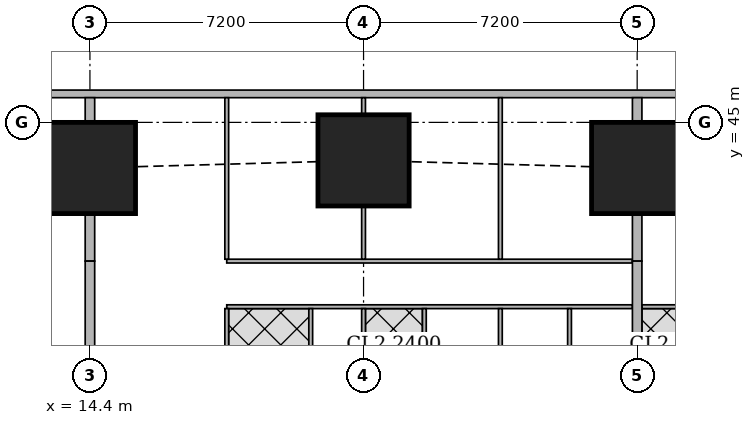
"""IFC4 building model, lengths in metres.
Left out: names, types, materials, properties, quantities, classifications, styles, units other than length and angle.
Written with IfcOpenShell. Run it as: python <this file> out.ifc"""

import sys

from ifc_helpers import new_model, si_unit, direction, frame, frame_2d, origin, origin_2d, place, context, subcontext, project, spatial, rectangle, extrude, element, fill, save


model = new_model("IFC4")
c1 = context("Model", 3, precision=1e-05, world=origin(), true_north=direction((0.0, 1.0)))
c2 = subcontext(c1, "Body", "Model", "MODEL_VIEW")
j1 = project(units=[si_unit("LENGTHUNIT", "METRE"), si_unit("PLANEANGLEUNIT", "RADIAN")], contexts=[c1])
p1 = place(None, origin())
s1 = spatial("IfcSite", under=j1, at=p1, CompositionType="ELEMENT")
p2 = place(p1, origin())
s2 = spatial("IfcBuilding", under=s1, at=p2, CompositionType="ELEMENT")
p3 = place(p2, frame((0.0, 0.0, 193.7)))
s3 = spatial("IfcBuildingStorey", under=s2, at=p3, CompositionType="ELEMENT", Elevation=193.7)
for number, where, z_axis, x_axis in (
    (1, (14.4, 43.8, 0.0), (0.0, 0.0, 1.0), (1.0, 0.0, 0.0)),
    (2, (21.6, 44.0, 0.0), (0.0, 0.0, 1.0), (1.0, 0.0, 0.0)),
    (3, (28.8, 43.8, 0.0), (0.0, 0.0, 1.0), (1.0, 0.0, 0.0)),
):
    element("IfcColumn", number, at=place(p3, frame(where, z_axis=z_axis, x_axis=x_axis)), inside=s3, PredefinedType="COLUMN", context=c2, shape_type="SweptSolid", body=[
        extrude(rectangle(XDim=2.4, YDim=2.4, at=origin_2d()), origin(), (0.0, 0.0, 1.0), 3.75),
    ])
p4 = place(p3, frame((40.106, 45.75, 0.0), z_axis=(0.0, 0.0, 1.0), x_axis=(-1.0, 0.0, 0.0)))
e4 = element("IfcWall", 4, at=p4, inside=s3, PredefinedType="SOLIDWALL", context=c2, shape_type="SweptSolid", body=[
    extrude(rectangle(XDim=32.743, YDim=0.2, at=frame_2d((16.372, 0.0))), origin(), (0.0, 0.0, 1.0), 3.5),
])
p5 = place(p4, frame((8.606, 0.0, 0.9)))
e5 = element("IfcOpeningElement", 5, at=p5, cuts=e4, PredefinedType="OPENING", context=c2, shape_type="SweptSolid", body=[
    extrude(rectangle(XDim=1.8, YDim=1.5, at=frame_2d((0.9, 0.75))), frame((0.0, 0.11, 0.0), z_axis=(0.0, -1.0, 0.0), x_axis=(1.0, 0.0, 0.0)), (0.0, 0.0, 1.0), 0.22),
])
p6 = place(p4, frame((12.206, 0.0, 0.9)))
e6 = element("IfcOpeningElement", 6, at=p6, cuts=e4, PredefinedType="OPENING", context=c2, shape_type="SweptSolid", body=[
    extrude(rectangle(XDim=1.8, YDim=1.5, at=frame_2d((0.9, 0.75))), frame((0.0, 0.11, 0.0), z_axis=(0.0, -1.0, 0.0), x_axis=(1.0, 0.0, 0.0)), (0.0, 0.0, 1.0), 0.22),
])
p7 = place(p4, frame((15.806, 0.0, 0.9)))
e7 = element("IfcOpeningElement", 7, at=p7, cuts=e4, PredefinedType="OPENING", context=c2, shape_type="SweptSolid", body=[
    extrude(rectangle(XDim=1.8, YDim=1.5, at=frame_2d((0.9, 0.75))), frame((0.0, 0.11, 0.0), z_axis=(0.0, -1.0, 0.0), x_axis=(1.0, 0.0, 0.0)), (0.0, 0.0, 1.0), 0.22),
])
p8 = place(p4, frame((19.406, 0.0, 0.9)))
e8 = element("IfcOpeningElement", 8, at=p8, cuts=e4, PredefinedType="OPENING", context=c2, shape_type="SweptSolid", body=[
    extrude(rectangle(XDim=1.8, YDim=1.5, at=frame_2d((0.9, 0.75))), frame((0.0, 0.11, 0.0), z_axis=(0.0, -1.0, 0.0), x_axis=(1.0, 0.0, 0.0)), (0.0, 0.0, 1.0), 0.22),
])
p9 = place(p4, frame((23.006, 0.0, 0.9)))
e9 = element("IfcOpeningElement", 9, at=p9, cuts=e4, PredefinedType="OPENING", context=c2, shape_type="SweptSolid", body=[
    extrude(rectangle(XDim=1.8, YDim=1.5, at=frame_2d((0.9, 0.75))), frame((0.0, 0.11, 0.0), z_axis=(0.0, -1.0, 0.0), x_axis=(1.0, 0.0, 0.0)), (0.0, 0.0, 1.0), 0.22),
])
p10 = place(p4, frame((28.025, 0.0, 0.9)))
e10 = element("IfcOpeningElement", 10, at=p10, cuts=e4, PredefinedType="OPENING", context=c2, shape_type="SweptSolid", body=[
    extrude(rectangle(XDim=2.4, YDim=1.5, at=frame_2d((1.2, 0.75))), frame((0.0, 0.11, 0.0), z_axis=(0.0, -1.0, 0.0), x_axis=(1.0, 0.0, 0.0)), (0.0, 0.0, 1.0), 0.22),
])
p11 = place(p3, frame((18.0, 41.35, 0.0), z_axis=(0.0, 0.0, 1.0), x_axis=(1.0, 0.0, 0.0)))
e11 = element("IfcWall", 11, at=p11, inside=s3, PredefinedType="PARTITIONING", context=c2, shape_type="SweptSolid", body=[
    extrude(rectangle(XDim=10.675, YDim=0.1, at=frame_2d((5.337, 0.0))), origin(), (0.0, 0.0, 1.0), 3.5),
])
p12 = place(p11, frame((0.2, 0.0, 0.0)))
e12 = element("IfcOpeningElement", 12, at=p12, cuts=e11, PredefinedType="OPENING", context=c2, shape_type="SweptSolid", body=[
    extrude(rectangle(XDim=0.9, YDim=2.1, at=frame_2d((0.45, 1.05))), frame((0.0, 0.06, 0.0), z_axis=(0.0, -1.0, 0.0), x_axis=(1.0, 0.0, 0.0)), (0.0, 0.0, 1.0), 0.12),
])
p13 = place(p11, frame((3.8, 0.0, 0.0)))
e13 = element("IfcOpeningElement", 13, at=p13, cuts=e11, PredefinedType="OPENING", context=c2, shape_type="SweptSolid", body=[
    extrude(rectangle(XDim=0.9, YDim=2.1, at=frame_2d((0.45, 1.05))), frame((0.0, 0.06, 0.0), z_axis=(0.0, -1.0, 0.0), x_axis=(1.0, 0.0, 0.0)), (0.0, 0.0, 1.0), 0.12),
])
p14 = place(p11, frame((7.4, 0.0, 0.0)))
e14 = element("IfcOpeningElement", 14, at=p14, cuts=e11, PredefinedType="OPENING", context=c2, shape_type="SweptSolid", body=[
    extrude(rectangle(XDim=0.9, YDim=2.1, at=frame_2d((0.45, 1.05))), frame((0.0, 0.06, 0.0), z_axis=(0.0, -1.0, 0.0), x_axis=(1.0, 0.0, 0.0)), (0.0, 0.0, 1.0), 0.12),
])
p15 = place(p3, frame((18.0, 40.15, 0.0), z_axis=(0.0, 0.0, 1.0), x_axis=(1.0, 0.0, 0.0)))
e15 = element("IfcWall", 15, at=p15, inside=s3, PredefinedType="PARTITIONING", context=c2, shape_type="SweptSolid", body=[
    extrude(rectangle(XDim=10.675, YDim=0.1, at=frame_2d((5.337, 0.0))), origin(), (0.0, 0.0, 1.0), 3.5),
])
p16 = place(p15, frame((0.655, 0.0, 0.0)))
e16 = element("IfcOpeningElement", 16, at=p16, cuts=e15, PredefinedType="OPENING", context=c2, shape_type="SweptSolid", body=[
    extrude(rectangle(XDim=0.9, YDim=2.1, at=frame_2d((0.45, 1.05))), frame((0.0, 0.06, 0.0), z_axis=(0.0, -1.0, 0.0), x_axis=(1.0, 0.0, 0.0)), (0.0, 0.0, 1.0), 0.12),
])
p17 = place(p15, frame((3.95, 0.0, 0.0)))
e17 = element("IfcOpeningElement", 17, at=p17, cuts=e15, PredefinedType="OPENING", context=c2, shape_type="SweptSolid", body=[
    extrude(rectangle(XDim=0.9, YDim=2.1, at=frame_2d((0.45, 1.05))), frame((0.0, 0.06, 0.0), z_axis=(0.0, -1.0, 0.0), x_axis=(1.0, 0.0, 0.0)), (0.0, 0.0, 1.0), 0.12),
])
p18 = place(p15, frame((7.66, 0.0, 0.0)))
e18 = element("IfcOpeningElement", 18, at=p18, cuts=e15, PredefinedType="OPENING", context=c2, shape_type="SweptSolid", body=[
    extrude(rectangle(XDim=0.9, YDim=2.1, at=frame_2d((0.45, 1.05))), frame((0.0, 0.06, 0.0), z_axis=(0.0, -1.0, 0.0), x_axis=(1.0, 0.0, 0.0)), (0.0, 0.0, 1.0), 0.12),
])
p19 = place(p15, frame((2.455, 0.0, 0.0)))
e19 = element("IfcOpeningElement", 19, at=p19, cuts=e15, PredefinedType="OPENING", context=c2, shape_type="SweptSolid", body=[
    extrude(rectangle(XDim=0.9, YDim=2.1, at=frame_2d((0.45, 1.05))), frame((0.0, 0.06, 0.0), z_axis=(0.0, -1.0, 0.0), x_axis=(1.0, 0.0, 0.0)), (0.0, 0.0, 1.0), 0.12),
])
p20 = place(p15, frame((5.75, 0.0, 0.0)))
e20 = element("IfcOpeningElement", 20, at=p20, cuts=e15, PredefinedType="OPENING", context=c2, shape_type="SweptSolid", body=[
    extrude(rectangle(XDim=0.9, YDim=2.1, at=frame_2d((0.45, 1.05))), frame((0.0, 0.06, 0.0), z_axis=(0.0, -1.0, 0.0), x_axis=(1.0, 0.0, 0.0)), (0.0, 0.0, 1.0), 0.12),
])
p21 = place(p15, frame((9.46, 0.0, 0.0)))
e21 = element("IfcOpeningElement", 21, at=p21, cuts=e15, PredefinedType="OPENING", context=c2, shape_type="SweptSolid", body=[
    extrude(rectangle(XDim=0.9, YDim=2.1, at=frame_2d((0.45, 1.05))), frame((0.0, 0.06, 0.0), z_axis=(0.0, -1.0, 0.0), x_axis=(1.0, 0.0, 0.0)), (0.0, 0.0, 1.0), 0.12),
])
p22 = place(p3, frame((18.0, 41.4, 0.0), z_axis=(0.0, 0.0, 1.0), x_axis=(0.0, 1.0, 0.0)))
e22 = element("IfcWall", 22, at=p22, inside=s3, PredefinedType="PARTITIONING", context=c2, shape_type="SweptSolid", body=[
    extrude(rectangle(XDim=4.25, YDim=0.1, at=frame_2d((2.125, 0.0))), origin(), (0.0, 0.0, 1.0), 2.05),
])
p23 = place(p3, frame((21.6, 41.4, 0.0), z_axis=(0.0, 0.0, 1.0), x_axis=(0.0, 1.0, 0.0)))
e23 = element("IfcWall", 23, at=p23, inside=s3, PredefinedType="PARTITIONING", context=c2, shape_type="SweptSolid", body=[
    extrude(rectangle(XDim=1.399, YDim=0.1, at=frame_2d((0.7, 0.0))), origin(), (0.0, 0.0, 1.0), 3.5),
])
p24 = place(p3, frame((21.6, 45.201, 0.0), z_axis=(0.0, 0.0, 1.0), x_axis=(0.0, 1.0, 0.0)))
e24 = element("IfcWall", 24, at=p24, inside=s3, PredefinedType="PARTITIONING", context=c2, shape_type="SweptSolid", body=[
    extrude(rectangle(XDim=0.449, YDim=0.1, at=frame_2d((0.225, 0.0))), origin(), (0.0, 0.0, 1.0), 3.5),
])
p25 = place(p3, frame((25.2, 41.4, 0.0), z_axis=(0.0, 0.0, 1.0), x_axis=(0.0, 1.0, 0.0)))
e25 = element("IfcWall", 25, at=p25, inside=s3, PredefinedType="PARTITIONING", context=c2, shape_type="SweptSolid", body=[
    extrude(rectangle(XDim=4.25, YDim=0.1, at=frame_2d((2.125, 0.0))), origin(), (0.0, 0.0, 1.0), 2.05),
])
p26 = place(p3, frame((18.0, 36.825, 0.0), z_axis=(0.0, 0.0, 1.0), x_axis=(0.0, 1.0, 0.0)))
e26 = element("IfcWall", 26, at=p26, inside=s3, PredefinedType="PARTITIONING", context=c2, shape_type="SweptSolid", body=[
    extrude(rectangle(XDim=3.275, YDim=0.1, at=frame_2d((1.638, 0.0))), origin(), (0.0, 0.0, 1.0), 3.5),
])
p27 = place(p3, frame((21.6, 38.201, 0.0), z_axis=(0.0, 0.0, 1.0), x_axis=(0.0, 1.0, 0.0)))
e27 = element("IfcWall", 27, at=p27, inside=s3, PredefinedType="PARTITIONING", context=c2, shape_type="SweptSolid", body=[
    extrude(rectangle(XDim=1.899, YDim=0.1, at=frame_2d((0.95, 0.0))), origin(), (0.0, 0.0, 1.0), 3.5),
])
for number, where, z_axis, x_axis in (
    (28, (25.2, 36.825, 0.0), (0.0, 0.0, 1.0), (0.0, 1.0, 0.0)),
    (29, (20.21, 36.825, 0.0), (0.0, 0.0, 1.0), (0.0, 1.0, 0.0)),
    (30, (23.2, 36.825, 0.0), (0.0, 0.0, 1.0), (0.0, 1.0, 0.0)),
    (31, (27.02, 36.825, 0.0), (0.0, 0.0, 1.0), (0.0, 1.0, 0.0)),
):
    element("IfcWall", number, at=place(p3, frame(where, z_axis=z_axis, x_axis=x_axis)), inside=s3, PredefinedType="PARTITIONING", context=c2, shape_type="SweptSolid", body=[
        extrude(rectangle(XDim=3.275, YDim=0.1, at=frame_2d((1.638, 0.0))), origin(), (0.0, 0.0, 1.0), 3.5),
    ])
p28 = place(p3, frame((14.4, 41.35, 0.0), z_axis=(0.0, 0.0, 1.0), x_axis=(0.0, 1.0, 0.0)))
e32 = element("IfcWall", 32, at=p28, inside=s3, PredefinedType="SOLIDWALL", context=c2, shape_type="SweptSolid", body=[
    extrude(rectangle(XDim=1.249, YDim=0.25, at=frame_2d((0.625, 0.0))), origin(), (0.0, 0.0, 1.0), 2.05),
])
p29 = place(p3, frame((14.4, 45.001, 0.0), z_axis=(0.0, 0.0, 1.0), x_axis=(0.0, 1.0, 0.0)))
e33 = element("IfcWall", 33, at=p29, inside=s3, PredefinedType="SOLIDWALL", context=c2, shape_type="SweptSolid", body=[
    extrude(rectangle(XDim=0.649, YDim=0.25, at=frame_2d((0.324, 0.0))), origin(), (0.0, 0.0, 1.0), 2.05),
])
p30 = place(p3, frame((14.4, 38.201, 0.0), z_axis=(0.0, 0.0, 1.0), x_axis=(0.0, 1.0, 0.0)))
e34 = element("IfcWall", 34, at=p30, inside=s3, PredefinedType="SOLIDWALL", context=c2, shape_type="SweptSolid", body=[
    extrude(rectangle(XDim=3.149, YDim=0.25, at=frame_2d((1.575, 0.0))), origin(), (0.0, 0.0, 1.0), 3.5),
])
p31 = place(p3, frame((28.925, 40.15, 0.0), z_axis=(0.0, 0.0, 1.0), x_axis=(1.0, 0.0, 0.0)))
e35 = element("IfcWall", 35, at=p31, inside=s3, PredefinedType="PARTITIONING", context=c2, shape_type="SweptSolid", body=[
    extrude(rectangle(XDim=1.904, YDim=0.1, at=frame_2d((0.952, 0.0))), origin(), (0.0, 0.0, 1.0), 3.5),
])
p32 = place(p31, frame((0.425, 0.0, 0.0)))
e36 = element("IfcOpeningElement", 36, at=p32, cuts=e35, PredefinedType="OPENING", context=c2, shape_type="SweptSolid", body=[
    extrude(rectangle(XDim=0.9, YDim=2.1, at=frame_2d((0.45, 1.05))), frame((0.0, 0.06, 0.0), z_axis=(0.0, -1.0, 0.0), x_axis=(1.0, 0.0, 0.0)), (0.0, 0.0, 1.0), 0.12),
])
p33 = place(p3, frame((28.8, 41.35, 0.0), z_axis=(0.0, 0.0, 1.0), x_axis=(0.0, 1.0, 0.0)))
e37 = element("IfcWall", 37, at=p33, inside=s3, PredefinedType="SOLIDWALL", context=c2, shape_type="SweptSolid", body=[
    extrude(rectangle(XDim=1.249, YDim=0.25, at=frame_2d((0.625, 0.0))), origin(), (0.0, 0.0, 1.0), 2.05),
])
p34 = place(p3, frame((28.8, 45.001, 0.0), z_axis=(0.0, 0.0, 1.0), x_axis=(0.0, 1.0, 0.0)))
e38 = element("IfcWall", 38, at=p34, inside=s3, PredefinedType="SOLIDWALL", context=c2, shape_type="SweptSolid", body=[
    extrude(rectangle(XDim=0.649, YDim=0.25, at=frame_2d((0.324, 0.0))), origin(), (0.0, 0.0, 1.0), 2.05),
])
p35 = place(p3, frame((28.8, 38.201, 0.0), z_axis=(0.0, 0.0, 1.0), x_axis=(0.0, 1.0, 0.0)))
e39 = element("IfcWall", 39, at=p35, inside=s3, PredefinedType="SOLIDWALL", context=c2, shape_type="SweptSolid", body=[
    extrude(rectangle(XDim=3.149, YDim=0.25, at=frame_2d((1.575, 0.0))), origin(), (0.0, 0.0, 1.0), 3.5),
])
p36 = place(p5, origin())
e40 = element("IfcWindow", 40, at=p36, inside=s3, PartitioningType="SINGLE_PANEL", PredefinedType="WINDOW", context=c2, shape_type="SweptSolid", body=[
    extrude(rectangle(XDim=1.8, YDim=1.5, at=frame_2d((0.9, 0.75))), frame((0.0, 0.03, 0.0), z_axis=(0.0, -1.0, 0.0), x_axis=(1.0, 0.0, 0.0)), (0.0, 0.0, 1.0), 0.06),
])
fill(e5, e40)
p37 = place(p6, origin())
e41 = element("IfcWindow", 41, at=p37, inside=s3, PartitioningType="SINGLE_PANEL", PredefinedType="WINDOW", context=c2, shape_type="SweptSolid", body=[
    extrude(rectangle(XDim=1.8, YDim=1.5, at=frame_2d((0.9, 0.75))), frame((0.0, 0.03, 0.0), z_axis=(0.0, -1.0, 0.0), x_axis=(1.0, 0.0, 0.0)), (0.0, 0.0, 1.0), 0.06),
])
fill(e6, e41)
p38 = place(p7, origin())
e42 = element("IfcWindow", 42, at=p38, inside=s3, PartitioningType="SINGLE_PANEL", PredefinedType="WINDOW", context=c2, shape_type="SweptSolid", body=[
    extrude(rectangle(XDim=1.8, YDim=1.5, at=frame_2d((0.9, 0.75))), frame((0.0, 0.03, 0.0), z_axis=(0.0, -1.0, 0.0), x_axis=(1.0, 0.0, 0.0)), (0.0, 0.0, 1.0), 0.06),
])
fill(e7, e42)
p39 = place(p8, origin())
e43 = element("IfcWindow", 43, at=p39, inside=s3, PartitioningType="SINGLE_PANEL", PredefinedType="WINDOW", context=c2, shape_type="SweptSolid", body=[
    extrude(rectangle(XDim=1.8, YDim=1.5, at=frame_2d((0.9, 0.75))), frame((0.0, 0.03, 0.0), z_axis=(0.0, -1.0, 0.0), x_axis=(1.0, 0.0, 0.0)), (0.0, 0.0, 1.0), 0.06),
])
fill(e8, e43)
p40 = place(p9, origin())
e44 = element("IfcWindow", 44, at=p40, inside=s3, PartitioningType="SINGLE_PANEL", PredefinedType="WINDOW", context=c2, shape_type="SweptSolid", body=[
    extrude(rectangle(XDim=1.8, YDim=1.5, at=frame_2d((0.9, 0.75))), frame((0.0, 0.03, 0.0), z_axis=(0.0, -1.0, 0.0), x_axis=(1.0, 0.0, 0.0)), (0.0, 0.0, 1.0), 0.06),
])
fill(e9, e44)
p41 = place(p12, origin())
e45 = element("IfcDoor", 45, at=p41, inside=s3, OperationType="SINGLE_SWING_LEFT", PredefinedType="DOOR", context=c2, shape_type="SweptSolid", body=[
    extrude(rectangle(XDim=0.9, YDim=2.1, at=frame_2d((0.45, 1.05))), frame((0.0, 0.025, 0.0), z_axis=(0.0, -1.0, 0.0), x_axis=(1.0, 0.0, 0.0)), (0.0, 0.0, 1.0), 0.05),
])
fill(e12, e45)
p42 = place(p13, origin())
e46 = element("IfcDoor", 46, at=p42, inside=s3, OperationType="SINGLE_SWING_LEFT", PredefinedType="DOOR", context=c2, shape_type="SweptSolid", body=[
    extrude(rectangle(XDim=0.9, YDim=2.1, at=frame_2d((0.45, 1.05))), frame((0.0, 0.025, 0.0), z_axis=(0.0, -1.0, 0.0), x_axis=(1.0, 0.0, 0.0)), (0.0, 0.0, 1.0), 0.05),
])
fill(e13, e46)
p43 = place(p14, origin())
e47 = element("IfcDoor", 47, at=p43, inside=s3, OperationType="SINGLE_SWING_LEFT", PredefinedType="DOOR", context=c2, shape_type="SweptSolid", body=[
    extrude(rectangle(XDim=0.9, YDim=2.1, at=frame_2d((0.45, 1.05))), frame((0.0, 0.025, 0.0), z_axis=(0.0, -1.0, 0.0), x_axis=(1.0, 0.0, 0.0)), (0.0, 0.0, 1.0), 0.05),
])
fill(e14, e47)
p44 = place(p16, origin())
e48 = element("IfcDoor", 48, at=p44, inside=s3, OperationType="SINGLE_SWING_RIGHT", PredefinedType="DOOR", context=c2, shape_type="SweptSolid", body=[
    extrude(rectangle(XDim=0.9, YDim=2.1, at=frame_2d((0.45, 1.05))), frame((0.0, 0.025, 0.0), z_axis=(0.0, -1.0, 0.0), x_axis=(1.0, 0.0, 0.0)), (0.0, 0.0, 1.0), 0.05),
])
fill(e16, e48)
p45 = place(p17, origin())
e49 = element("IfcDoor", 49, at=p45, inside=s3, OperationType="SINGLE_SWING_RIGHT", PredefinedType="DOOR", context=c2, shape_type="SweptSolid", body=[
    extrude(rectangle(XDim=0.9, YDim=2.1, at=frame_2d((0.45, 1.05))), frame((0.0, 0.025, 0.0), z_axis=(0.0, -1.0, 0.0), x_axis=(1.0, 0.0, 0.0)), (0.0, 0.0, 1.0), 0.05),
])
fill(e17, e49)
p46 = place(p18, origin())
e50 = element("IfcDoor", 50, at=p46, inside=s3, OperationType="SINGLE_SWING_RIGHT", PredefinedType="DOOR", context=c2, shape_type="SweptSolid", body=[
    extrude(rectangle(XDim=0.9, YDim=2.1, at=frame_2d((0.45, 1.05))), frame((0.0, 0.025, 0.0), z_axis=(0.0, -1.0, 0.0), x_axis=(1.0, 0.0, 0.0)), (0.0, 0.0, 1.0), 0.05),
])
fill(e18, e50)
p47 = place(p19, origin())
e51 = element("IfcDoor", 51, at=p47, inside=s3, OperationType="SINGLE_SWING_LEFT", PredefinedType="DOOR", context=c2, shape_type="SweptSolid", body=[
    extrude(rectangle(XDim=0.9, YDim=2.1, at=frame_2d((0.45, 1.05))), frame((0.0, 0.025, 0.0), z_axis=(0.0, -1.0, 0.0), x_axis=(1.0, 0.0, 0.0)), (0.0, 0.0, 1.0), 0.05),
])
fill(e19, e51)
p48 = place(p20, origin())
e52 = element("IfcDoor", 52, at=p48, inside=s3, OperationType="SINGLE_SWING_LEFT", PredefinedType="DOOR", context=c2, shape_type="SweptSolid", body=[
    extrude(rectangle(XDim=0.9, YDim=2.1, at=frame_2d((0.45, 1.05))), frame((0.0, 0.025, 0.0), z_axis=(0.0, -1.0, 0.0), x_axis=(1.0, 0.0, 0.0)), (0.0, 0.0, 1.0), 0.05),
])
fill(e20, e52)
p49 = place(p21, origin())
e53 = element("IfcDoor", 53, at=p49, inside=s3, OperationType="SINGLE_SWING_LEFT", PredefinedType="DOOR", context=c2, shape_type="SweptSolid", body=[
    extrude(rectangle(XDim=0.9, YDim=2.1, at=frame_2d((0.45, 1.05))), frame((0.0, 0.025, 0.0), z_axis=(0.0, -1.0, 0.0), x_axis=(1.0, 0.0, 0.0)), (0.0, 0.0, 1.0), 0.05),
])
fill(e21, e53)
p50 = place(p32, origin())
e54 = element("IfcDoor", 54, at=p50, inside=s3, OperationType="SINGLE_SWING_RIGHT", PredefinedType="DOOR", context=c2, shape_type="SweptSolid", body=[
    extrude(rectangle(XDim=0.9, YDim=2.1, at=frame_2d((0.45, 1.05))), frame((0.0, 0.025, 0.0), z_axis=(0.0, -1.0, 0.0), x_axis=(1.0, 0.0, 0.0)), (0.0, 0.0, 1.0), 0.05),
])
fill(e36, e54)
save(model, sys.argv[1])
